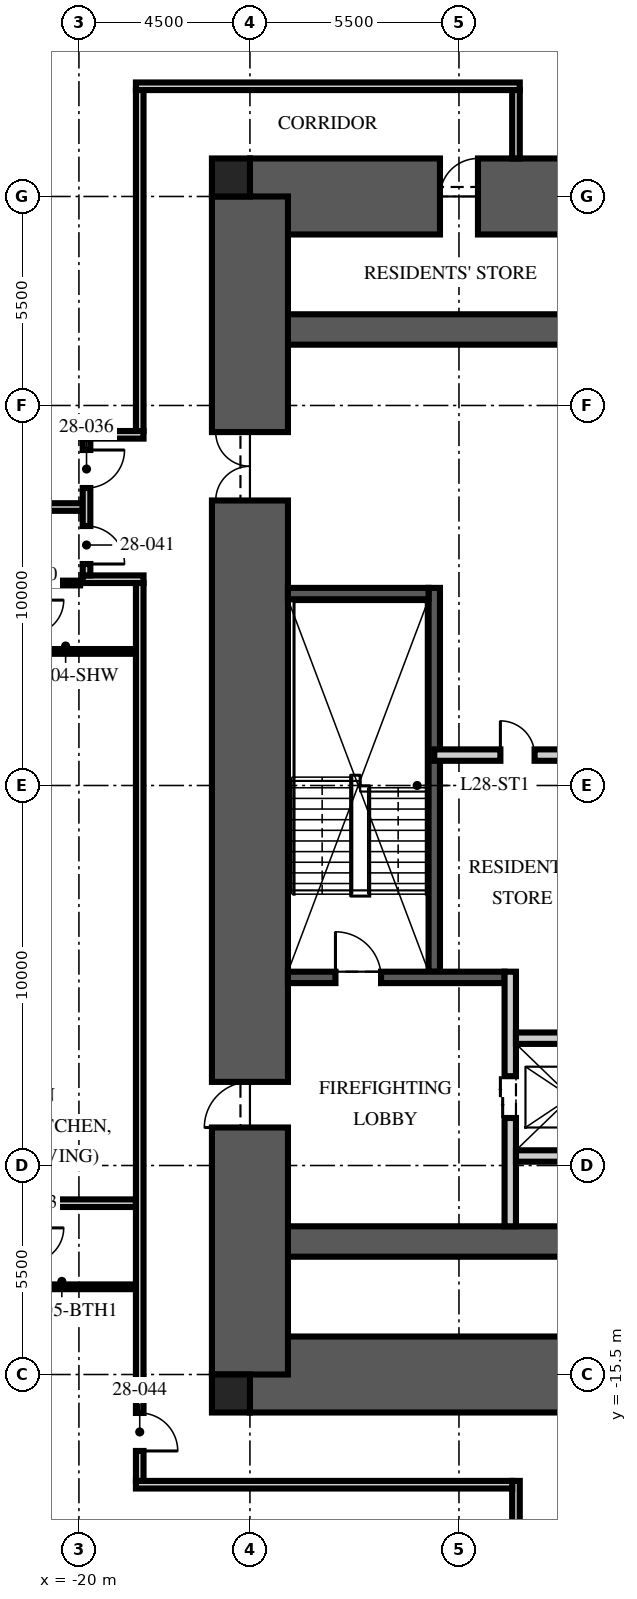
"""IFC4 building model, lengths in metres.
Left out: names, types, materials, properties, quantities, classifications, styles, units other than length and angle.
Written with IfcOpenShell. Run it as: python <this file> out.ifc"""

import sys

from ifc_helpers import new_model, si_unit, direction, frame, frame_2d, origin, origin_2d, place, context, subcontext, project, spatial, rectangle, extrude, element, fill, save


model = new_model("IFC4")
c1 = context("Model", 3, precision=1e-05, world=origin(), true_north=direction((0.0, 1.0)))
c2 = subcontext(c1, "Body", "Model", "MODEL_VIEW")
j1 = project(units=[si_unit("LENGTHUNIT", "METRE"), si_unit("PLANEANGLEUNIT", "RADIAN")], contexts=[c1])
p1 = place(None, origin())
s1 = spatial("IfcSite", under=j1, at=p1, CompositionType="ELEMENT")
p2 = place(p1, origin())
s2 = spatial("IfcBuilding", under=s1, at=p2, CompositionType="ELEMENT")
p3 = place(p2, frame((0.0, 0.0, 114.75)))
s3 = spatial("IfcBuildingStorey", under=s2, at=p3, CompositionType="ELEMENT", Elevation=114.75)
p4 = place(p3, frame((-15.5, 15.5, -0.25), z_axis=(0.0, 0.0, 1.0), x_axis=(1.0, 0.0, 0.0)))
e1 = element("IfcWall", 1, at=p4, inside=s3, PredefinedType="SHEAR", context=c2, shape_type="SweptSolid", body=[
    extrude(rectangle(XDim=31.0, YDim=2.0, at=frame_2d((15.5, 0.0))), origin(), (0.0, 0.0, 1.0), 3.75),
])
p5 = place(p4, frame((5.0, 0.0, 0.25)))
e2 = element("IfcOpeningElement", 2, at=p5, cuts=e1, PredefinedType="OPENING", context=c2, shape_type="SweptSolid", body=[
    extrude(rectangle(XDim=1.0, YDim=2.1, at=frame_2d((0.5, 1.05))), frame((0.0, 1.01, 0.0), z_axis=(0.0, -1.0, 0.0), x_axis=(1.0, 0.0, 0.0)), (0.0, 0.0, 1.0), 2.02),
])
p6 = place(p3, frame((-15.5, -15.5, -0.25), z_axis=(0.0, 0.0, 1.0), x_axis=(1.0, 0.0, 0.0)))
e3 = element("IfcWall", 3, at=p6, inside=s3, PredefinedType="SHEAR", context=c2, shape_type="SweptSolid", body=[
    extrude(rectangle(XDim=31.0, YDim=2.0, at=frame_2d((15.5, 0.0))), origin(), (0.0, 0.0, 1.0), 3.75),
])
p7 = place(p6, frame((10.4, 0.0, 0.25)))
e4 = element("IfcOpeningElement", 4, at=p7, cuts=e3, PredefinedType="OPENING", context=c2, shape_type="SweptSolid", body=[
    extrude(rectangle(XDim=1.1, YDim=2.1, at=frame_2d((0.55, 1.05))), frame((0.0, 1.01, 0.0), z_axis=(0.0, -1.0, 0.0), x_axis=(1.0, 0.0, 0.0)), (0.0, 0.0, 1.0), 2.02),
])
p8 = place(p6, frame((13.5, 0.0, 0.25)))
e5 = element("IfcOpeningElement", 5, at=p8, cuts=e3, PredefinedType="OPENING", context=c2, shape_type="SweptSolid", body=[
    extrude(rectangle(XDim=1.1, YDim=2.1, at=frame_2d((0.55, 1.05))), frame((0.0, 1.01, 0.0), z_axis=(0.0, -1.0, 0.0), x_axis=(1.0, 0.0, 0.0)), (0.0, 0.0, 1.0), 2.02),
])
p9 = place(p6, frame((16.6, 0.0, 0.25)))
e6 = element("IfcOpeningElement", 6, at=p9, cuts=e3, PredefinedType="OPENING", context=c2, shape_type="SweptSolid", body=[
    extrude(rectangle(XDim=1.1, YDim=2.1, at=frame_2d((0.55, 1.05))), frame((0.0, 1.01, 0.0), z_axis=(0.0, -1.0, 0.0), x_axis=(1.0, 0.0, 0.0)), (0.0, 0.0, 1.0), 2.02),
])
for number, where, z_axis, x_axis in (
    (7, (-15.5, 12.0, -0.25), (0.0, 0.0, 1.0), (1.0, 0.0, 0.0)),
    (8, (-15.5, -12.0, -0.25), (0.0, 0.0, 1.0), (1.0, 0.0, 0.0)),
):
    element("IfcWall", number, at=place(p3, frame(where, z_axis=z_axis, x_axis=x_axis)), inside=s3, PredefinedType="SHEAR", context=c2, shape_type="SweptSolid", body=[
        extrude(rectangle(XDim=31.0, YDim=0.8, at=frame_2d((15.5, 0.0))), origin(), (0.0, 0.0, 1.0), 3.75),
    ])
p10 = place(p3, frame((-15.5, -15.5, -0.25), z_axis=(0.0, 0.0, 1.0), x_axis=(0.0, 1.0, 0.0)))
e9 = element("IfcWall", 9, at=p10, inside=s3, PredefinedType="SHEAR", context=c2, shape_type="SweptSolid", body=[
    extrude(rectangle(XDim=31.0, YDim=2.0, at=frame_2d((15.5, 0.0))), origin(), (0.0, 0.0, 1.0), 3.75),
])
p11 = place(p10, frame((6.5, 0.0, 0.25)))
e10 = element("IfcOpeningElement", 10, at=p11, cuts=e9, PredefinedType="OPENING", context=c2, shape_type="SweptSolid", body=[
    extrude(rectangle(XDim=1.2, YDim=2.1, at=frame_2d((0.6, 1.05))), frame((0.0, 1.01, 0.0), z_axis=(0.0, -1.0, 0.0), x_axis=(1.0, 0.0, 0.0)), (0.0, 0.0, 1.0), 2.02),
])
p12 = place(p10, frame((23.0, 0.0, 0.25)))
e11 = element("IfcOpeningElement", 11, at=p12, cuts=e9, PredefinedType="OPENING", context=c2, shape_type="SweptSolid", body=[
    extrude(rectangle(XDim=1.8, YDim=2.1, at=frame_2d((0.9, 1.05))), frame((0.0, 1.01, 0.0), z_axis=(0.0, -1.0, 0.0), x_axis=(1.0, 0.0, 0.0)), (0.0, 0.0, 1.0), 2.02),
])
for number, where, z_axis, x_axis in (
    (12, (-16.0, 16.0, -0.25), (0.0, 0.0, 1.0), (1.0, 0.0, 0.0)),
    (13, (-16.0, -16.0, -0.25), (0.0, 0.0, 1.0), (1.0, 0.0, 0.0)),
):
    element("IfcColumn", number, at=place(p3, frame(where, z_axis=z_axis, x_axis=x_axis)), inside=s3, PredefinedType="COLUMN", context=c2, shape_type="SweptSolid", body=[
        extrude(rectangle(XDim=1.0, YDim=1.0, at=origin_2d()), origin(), (0.0, 0.0, 1.0), 3.75),
    ])
p13 = place(p3, frame((-10.65, -4.9, 0.0), z_axis=(0.0, 0.0, 1.0), x_axis=(0.0, 1.0, 0.0)))
e14 = element("IfcWall", 14, at=p13, inside=s3, PredefinedType="SOLIDWALL", context=c2, shape_type="SweptSolid", body=[
    extrude(rectangle(XDim=10.1, YDim=0.3, at=frame_2d((5.05, 0.0))), origin(), (0.0, 0.0, 1.0), 3.5),
])
p14 = place(p3, frame((-14.5, -5.05, 0.0), z_axis=(0.0, 0.0, 1.0), x_axis=(1.0, 0.0, 0.0)))
e15 = element("IfcWall", 15, at=p14, inside=s3, PredefinedType="SOLIDWALL", context=c2, shape_type="SweptSolid", body=[
    extrude(rectangle(XDim=5.7, YDim=0.3, at=frame_2d((2.85, 0.0))), origin(), (0.0, 0.0, 1.0), 3.5),
])
p15 = place(p14, frame((1.25, 0.0, 0.0)))
e16 = element("IfcOpeningElement", 16, at=p15, cuts=e15, PredefinedType="OPENING", context=c2, shape_type="SweptSolid", body=[
    extrude(rectangle(XDim=1.2, YDim=2.1, at=frame_2d((0.6, 1.05))), frame((0.0, 0.16, 0.0), z_axis=(0.0, -1.0, 0.0), x_axis=(1.0, 0.0, 0.0)), (0.0, 0.0, 1.0), 0.32),
])
p16 = place(p3, frame((-14.5, 5.05, 0.0), z_axis=(0.0, 0.0, 1.0), x_axis=(1.0, 0.0, 0.0)))
e17 = element("IfcWall", 17, at=p16, inside=s3, PredefinedType="SOLIDWALL", context=c2, shape_type="SweptSolid", body=[
    extrude(rectangle(XDim=3.7, YDim=0.3, at=frame_2d((1.85, 0.0))), origin(), (0.0, 0.0, 1.0), 3.5),
])
p17 = place(p3, frame((-8.65, -11.6, 0.0), z_axis=(0.0, 0.0, 1.0), x_axis=(0.0, 1.0, 0.0)))
e18 = element("IfcWall", 18, at=p17, inside=s3, PredefinedType="PARTITIONING", context=c2, shape_type="SweptSolid", body=[
    extrude(rectangle(XDim=6.7, YDim=0.3, at=frame_2d((3.35, 0.0))), origin(), (0.0, 0.0, 1.0), 3.5),
])
p18 = place(p17, frame((2.85, 0.0, 0.0)))
e19 = element("IfcOpeningElement", 19, at=p18, cuts=e18, PredefinedType="OPENING", context=c2, shape_type="SweptSolid", body=[
    extrude(rectangle(XDim=1.1, YDim=2.1, at=frame_2d((0.55, 1.05))), frame((0.0, 0.16, 0.0), z_axis=(0.0, -1.0, 0.0), x_axis=(1.0, 0.0, 0.0)), (0.0, 0.0, 1.0), 0.32),
])
p19 = place(p3, frame((-8.5, -6.65, 0.0), z_axis=(0.0, 0.0, 1.0), x_axis=(1.0, 0.0, 0.0)))
e20 = element("IfcWall", 20, at=p19, inside=s3, PredefinedType="PARTITIONING", context=c2, shape_type="SweptSolid", body=[
    extrude(rectangle(XDim=17.0, YDim=0.3, at=frame_2d((8.5, 0.0))), origin(), (0.0, 0.0, 1.0), 3.5),
])
p20 = place(p19, frame((7.8, 0.0, 0.0)))
e21 = element("IfcOpeningElement", 21, at=p20, cuts=e20, PredefinedType="OPENING", context=c2, shape_type="SweptSolid", body=[
    extrude(rectangle(XDim=1.3, YDim=2.4, at=frame_2d((0.65, 1.2))), frame((0.0, 0.16, 0.0), z_axis=(0.0, -1.0, 0.0), x_axis=(1.0, 0.0, 0.0)), (0.0, 0.0, 1.0), 0.32),
])
p21 = place(p19, frame((5.65, 0.0, 0.0)))
e22 = element("IfcOpeningElement", 22, at=p21, cuts=e20, PredefinedType="OPENING", context=c2, shape_type="SweptSolid", body=[
    extrude(rectangle(XDim=0.9, YDim=2.1, at=frame_2d((0.45, 1.05))), frame((0.0, 0.16, 0.0), z_axis=(0.0, -1.0, 0.0), x_axis=(1.0, 0.0, 0.0)), (0.0, 0.0, 1.0), 0.32),
])
p22 = place(p19, frame((10.4, 0.0, 0.0)))
e23 = element("IfcOpeningElement", 23, at=p22, cuts=e20, PredefinedType="OPENING", context=c2, shape_type="SweptSolid", body=[
    extrude(rectangle(XDim=0.9, YDim=2.1, at=frame_2d((0.45, 1.05))), frame((0.0, 0.16, 0.0), z_axis=(0.0, -1.0, 0.0), x_axis=(1.0, 0.0, 0.0)), (0.0, 0.0, 1.0), 0.32),
])
p23 = place(p3, frame((-8.5, -9.75, 0.0), z_axis=(0.0, 0.0, 1.0), x_axis=(1.0, 0.0, 0.0)))
e24 = element("IfcWall", 24, at=p23, inside=s3, PredefinedType="PARTITIONING", context=c2, shape_type="SweptSolid", body=[
    extrude(rectangle(XDim=2.9, YDim=0.3, at=frame_2d((1.45, 0.0))), origin(), (0.0, 0.0, 1.0), 3.5),
])
p24 = place(p3, frame((-10.65, 0.8, 0.0), z_axis=(0.0, 0.0, 1.0), x_axis=(1.0, 0.0, 0.0)))
e25 = element("IfcWall", 25, at=p24, inside=s3, PredefinedType="PARTITIONING", context=c2, shape_type="SweptSolid", body=[
    extrude(rectangle(XDim=21.3, YDim=0.3, at=frame_2d((10.65, 0.0))), origin(), (0.0, 0.0, 1.0), 3.5),
])
p25 = place(p24, frame((10.05, 0.0, 0.0)))
e26 = element("IfcOpeningElement", 26, at=p25, cuts=e25, PredefinedType="OPENING", context=c2, shape_type="SweptSolid", body=[
    extrude(rectangle(XDim=1.2, YDim=2.1, at=frame_2d((0.6, 1.05))), frame((0.0, 0.16, 0.0), z_axis=(0.0, -1.0, 0.0), x_axis=(1.0, 0.0, 0.0)), (0.0, 0.0, 1.0), 0.32),
])
p26 = place(p24, frame((1.74, 0.0, 0.0)))
e27 = element("IfcOpeningElement", 27, at=p26, cuts=e25, PredefinedType="OPENING", context=c2, shape_type="SweptSolid", body=[
    extrude(rectangle(XDim=0.9, YDim=2.1, at=frame_2d((0.45, 1.05))), frame((0.0, 0.16, 0.0), z_axis=(0.0, -1.0, 0.0), x_axis=(1.0, 0.0, 0.0)), (0.0, 0.0, 1.0), 0.32),
])
p27 = place(p3, frame((-18.5, 18.4, 0.0), z_axis=(0.0, 0.0, 1.0), x_axis=(1.0, 0.0, 0.0)))
e28 = element("IfcWall", 28, at=p27, inside=s3, PredefinedType="PARTITIONING", context=c2, shape_type="SweptSolid", body=[
    extrude(rectangle(XDim=10.1, YDim=0.2, at=frame_2d((5.05, 0.0))), origin(), (0.0, 0.0, 1.0), 2.3),
])
p28 = place(p3, frame((-8.5, 18.3, 0.0), z_axis=(0.0, 0.0, 1.0), x_axis=(0.0, -1.0, 0.0)))
e29 = element("IfcWall", 29, at=p28, inside=s3, PredefinedType="PARTITIONING", context=c2, shape_type="SweptSolid", body=[
    extrude(rectangle(XDim=1.8, YDim=0.2, at=frame_2d((0.9, 0.0))), origin(), (0.0, 0.0, 1.0), 3.5),
])
p29 = place(p3, frame((-19.9, 7.328, 0.0), z_axis=(0.0, 0.0, 1.0), x_axis=(-1.0, 0.0, 0.0)))
e30 = element("IfcWall", 30, at=p29, inside=s3, PredefinedType="PARTITIONING", context=c2, shape_type="SweptSolid", body=[
    extrude(rectangle(XDim=9.25, YDim=0.2, at=frame_2d((4.625, 0.0))), origin(), (0.0, 0.0, 1.0), 2.81),
])
p30 = place(p3, frame((-18.5, -10.992, 0.0), z_axis=(0.0, 0.0, 1.0), x_axis=(-1.0, 0.0, 0.0)))
e31 = element("IfcWall", 31, at=p30, inside=s3, PredefinedType="PARTITIONING", context=c2, shape_type="SweptSolid", body=[
    extrude(rectangle(XDim=10.65, YDim=0.2, at=frame_2d((5.325, 0.0))), origin(), (0.0, 0.0, 1.0), 2.81),
])
p31 = place(p3, frame((-19.97, 5.328, 0.0), z_axis=(0.0, 0.0, 1.0), x_axis=(-1.0, 0.0, 0.0)))
e32 = element("IfcWall", 32, at=p31, inside=s3, PredefinedType="PARTITIONING", context=c2, shape_type="SweptSolid", body=[
    extrude(rectangle(XDim=1.33, YDim=0.125, at=frame_2d((0.665, 0.0))), origin(), (0.0, 0.0, 1.0), 3.5),
])
for number, where, z_axis, x_axis in (
    (33, (-18.5, 3.528, 0.0), (0.0, 0.0, 1.0), (-1.0, 0.0, 0.0)),
    (34, (-18.5, -13.192, 0.0), (0.0, 0.0, 1.0), (-1.0, 0.0, 0.0)),
):
    element("IfcWall", number, at=place(p3, frame(where, z_axis=z_axis, x_axis=x_axis)), inside=s3, PredefinedType="PARTITIONING", context=c2, shape_type="SweptSolid", body=[
        extrude(rectangle(XDim=2.8, YDim=0.125, at=frame_2d((1.4, 0.0))), origin(), (0.0, 0.0, 1.0), 3.5),
    ])
p32 = place(p3, frame((-18.4, 18.3, 0.0), z_axis=(0.0, 0.0, 1.0), x_axis=(0.0, -1.0, 0.0)))
e35 = element("IfcWall", 35, at=p32, inside=s3, PredefinedType="PARTITIONING", context=c2, shape_type="SweptSolid", body=[
    extrude(rectangle(XDim=8.972, YDim=0.2, at=frame_2d((4.486, 0.0))), origin(), (0.0, 0.0, 1.0), 2.3),
])
p33 = place(p3, frame((-18.3, 9.228, 0.0), z_axis=(0.0, 0.0, 1.0), x_axis=(-1.0, 0.0, 0.0)))
e36 = element("IfcWall", 36, at=p33, inside=s3, PredefinedType="PARTITIONING", context=c2, shape_type="SweptSolid", body=[
    extrude(rectangle(XDim=1.6, YDim=0.2, at=frame_2d((0.8, 0.0))), origin(), (0.0, 0.0, 1.0), 2.7),
])
p34 = place(p3, frame((-18.3, 5.428, 0.0), z_axis=(0.0, 0.0, 1.0), x_axis=(-1.0, 0.0, 0.0)))
e37 = element("IfcWall", 37, at=p34, inside=s3, PredefinedType="PARTITIONING", context=c2, shape_type="SweptSolid", body=[
    extrude(rectangle(XDim=1.6, YDim=0.2, at=frame_2d((0.8, 0.0))), origin(), (0.0, 0.0, 1.0), 3.5),
])
p35 = place(p3, frame((-19.8, 9.128, 0.0), z_axis=(0.0, 0.0, 1.0), x_axis=(0.0, -1.0, 0.0)))
e38 = element("IfcWall", 38, at=p35, inside=s3, PredefinedType="PARTITIONING", context=c2, shape_type="SweptSolid", body=[
    extrude(rectangle(XDim=3.6, YDim=0.2, at=frame_2d((1.8, 0.0))), origin(), (0.0, 0.0, 1.0), 2.7),
])
p36 = place(p35, frame((0.3, 0.0, 0.0)))
e39 = element("IfcOpeningElement", 39, at=p36, cuts=e38, PredefinedType="OPENING", context=c2, shape_type="SweptSolid", body=[
    extrude(rectangle(XDim=1.0, YDim=2.2, at=frame_2d((0.5, 1.1))), frame((0.0, 0.11, 0.0), z_axis=(0.0, -1.0, 0.0), x_axis=(1.0, 0.0, 0.0)), (0.0, 0.0, 1.0), 0.22),
])
p37 = place(p35, frame((2.3, 0.0, 0.0)))
e40 = element("IfcOpeningElement", 40, at=p37, cuts=e38, PredefinedType="OPENING", context=c2, shape_type="SweptSolid", body=[
    extrude(rectangle(XDim=1.0, YDim=2.2, at=frame_2d((0.5, 1.1))), frame((0.0, 0.11, 0.0), z_axis=(0.0, -1.0, 0.0), x_axis=(1.0, 0.0, 0.0)), (0.0, 0.0, 1.0), 0.22),
])
p38 = place(p3, frame((-18.4, 5.328, 0.0), z_axis=(0.0, 0.0, 1.0), x_axis=(0.0, -1.0, 0.0)))
e41 = element("IfcWall", 41, at=p38, inside=s3, PredefinedType="PARTITIONING", context=c2, shape_type="SweptSolid", body=[
    extrude(rectangle(XDim=23.628, YDim=0.2, at=frame_2d((11.814, 0.0))), origin(), (0.0, 0.0, 1.0), 2.3),
])
p39 = place(p38, frame((21.84, 0.0, 0.0)))
e42 = element("IfcOpeningElement", 42, at=p39, cuts=e41, PredefinedType="OPENING", context=c2, shape_type="SweptSolid", body=[
    extrude(rectangle(XDim=1.0, YDim=2.2, at=frame_2d((0.5, 1.1))), frame((0.0, 0.11, 0.0), z_axis=(0.0, -1.0, 0.0), x_axis=(1.0, 0.0, 0.0)), (0.0, 0.0, 1.0), 0.22),
])
p40 = place(p3, frame((-8.5, -18.3, 0.0), z_axis=(0.0, 0.0, 1.0), x_axis=(0.0, -1.0, 0.0)))
e43 = element("IfcWall", 43, at=p40, inside=s3, PredefinedType="PARTITIONING", context=c2, shape_type="SweptSolid", body=[
    extrude(rectangle(XDim=3.0, YDim=0.2, at=frame_2d((1.5, 0.0))), origin(), (0.0, 0.0, 1.0), 3.5),
])
p41 = place(p3, frame((-8.6, -18.4, 0.0), z_axis=(0.0, 0.0, 1.0), x_axis=(-1.0, 0.0, 0.0)))
e44 = element("IfcWall", 44, at=p41, inside=s3, PredefinedType="PARTITIONING", context=c2, shape_type="SweptSolid", body=[
    extrude(rectangle(XDim=9.9, YDim=0.2, at=frame_2d((4.95, 0.0))), origin(), (0.0, 0.0, 1.0), 2.3),
])
p42 = place(p15, origin())
e45 = element("IfcDoor", 45, at=p42, inside=s3, OperationType="SINGLE_SWING_LEFT", PredefinedType="DOOR", context=c2, shape_type="SweptSolid", body=[
    extrude(rectangle(XDim=1.2, YDim=2.1, at=frame_2d((0.6, 1.05))), frame((0.0, 0.025, 0.0), z_axis=(0.0, -1.0, 0.0), x_axis=(1.0, 0.0, 0.0)), (0.0, 0.0, 1.0), 0.05),
])
fill(e16, e45)
p43 = place(p11, origin())
e46 = element("IfcDoor", 46, at=p43, inside=s3, OperationType="SINGLE_SWING_LEFT", PredefinedType="DOOR", context=c2, shape_type="SweptSolid", body=[
    extrude(rectangle(XDim=1.2, YDim=2.1, at=frame_2d((0.6, 1.05))), frame((0.0, 0.025, 0.0), z_axis=(0.0, -1.0, 0.0), x_axis=(1.0, 0.0, 0.0)), (0.0, 0.0, 1.0), 0.05),
])
fill(e10, e46)
p44 = place(p12, origin())
e47 = element("IfcDoor", 47, at=p44, inside=s3, OperationType="DOUBLE_DOOR_SINGLE_SWING", PredefinedType="DOOR", context=c2, shape_type="SweptSolid", body=[
    extrude(rectangle(XDim=1.8, YDim=2.1, at=frame_2d((0.9, 1.05))), frame((0.0, 0.025, 0.0), z_axis=(0.0, -1.0, 0.0), x_axis=(1.0, 0.0, 0.0)), (0.0, 0.0, 1.0), 0.05),
])
fill(e11, e47)
p45 = place(p18, origin())
e48 = element("IfcDoor", 48, at=p45, inside=s3, OperationType="DOUBLE_DOOR_SLIDING", PredefinedType="DOOR", context=c2, shape_type="SweptSolid", body=[
    extrude(rectangle(XDim=1.1, YDim=2.1, at=frame_2d((0.55, 1.05))), frame((0.0, 0.025, 0.0), z_axis=(0.0, -1.0, 0.0), x_axis=(1.0, 0.0, 0.0)), (0.0, 0.0, 1.0), 0.05),
])
fill(e19, e48)
p46 = place(p26, origin())
e49 = element("IfcDoor", 49, at=p46, inside=s3, OperationType="SINGLE_SWING_LEFT", PredefinedType="DOOR", context=c2, shape_type="SweptSolid", body=[
    extrude(rectangle(XDim=0.9, YDim=2.1, at=frame_2d((0.45, 1.05))), frame((0.0, 0.025, 0.0), z_axis=(0.0, -1.0, 0.0), x_axis=(1.0, 0.0, 0.0)), (0.0, 0.0, 1.0), 0.05),
])
fill(e27, e49)
p47 = place(p5, origin())
e50 = element("IfcDoor", 50, at=p47, inside=s3, OperationType="SINGLE_SWING_RIGHT", PredefinedType="DOOR", context=c2, shape_type="SweptSolid", body=[
    extrude(rectangle(XDim=1.0, YDim=2.1, at=frame_2d((0.5, 1.05))), frame((0.0, 0.025, 0.0), z_axis=(0.0, -1.0, 0.0), x_axis=(1.0, 0.0, 0.0)), (0.0, 0.0, 1.0), 0.05),
])
fill(e2, e50)
p48 = place(p36, origin())
e51 = element("IfcDoor", 51, at=p48, inside=s3, OperationType="SINGLE_SWING_LEFT", PredefinedType="DOOR", context=c2, shape_type="SweptSolid", body=[
    extrude(rectangle(XDim=1.0, YDim=2.2, at=frame_2d((0.5, 1.1))), frame((0.0, 0.025, 0.0), z_axis=(0.0, -1.0, 0.0), x_axis=(1.0, 0.0, 0.0)), (0.0, 0.0, 1.0), 0.05),
])
fill(e39, e51)
p49 = place(p37, origin())
e52 = element("IfcDoor", 52, at=p49, inside=s3, OperationType="SINGLE_SWING_RIGHT", PredefinedType="DOOR", context=c2, shape_type="SweptSolid", body=[
    extrude(rectangle(XDim=1.0, YDim=2.2, at=frame_2d((0.5, 1.1))), frame((0.0, 0.025, 0.0), z_axis=(0.0, -1.0, 0.0), x_axis=(1.0, 0.0, 0.0)), (0.0, 0.0, 1.0), 0.05),
])
fill(e40, e52)
p50 = place(p39, origin())
e53 = element("IfcDoor", 53, at=p50, inside=s3, OperationType="SINGLE_SWING_RIGHT", PredefinedType="DOOR", context=c2, shape_type="SweptSolid", body=[
    extrude(rectangle(XDim=1.0, YDim=2.2, at=frame_2d((0.5, 1.1))), frame((0.0, 0.025, 0.0), z_axis=(0.0, -1.0, 0.0), x_axis=(1.0, 0.0, 0.0)), (0.0, 0.0, 1.0), 0.05),
])
fill(e42, e53)
save(model, sys.argv[1])
